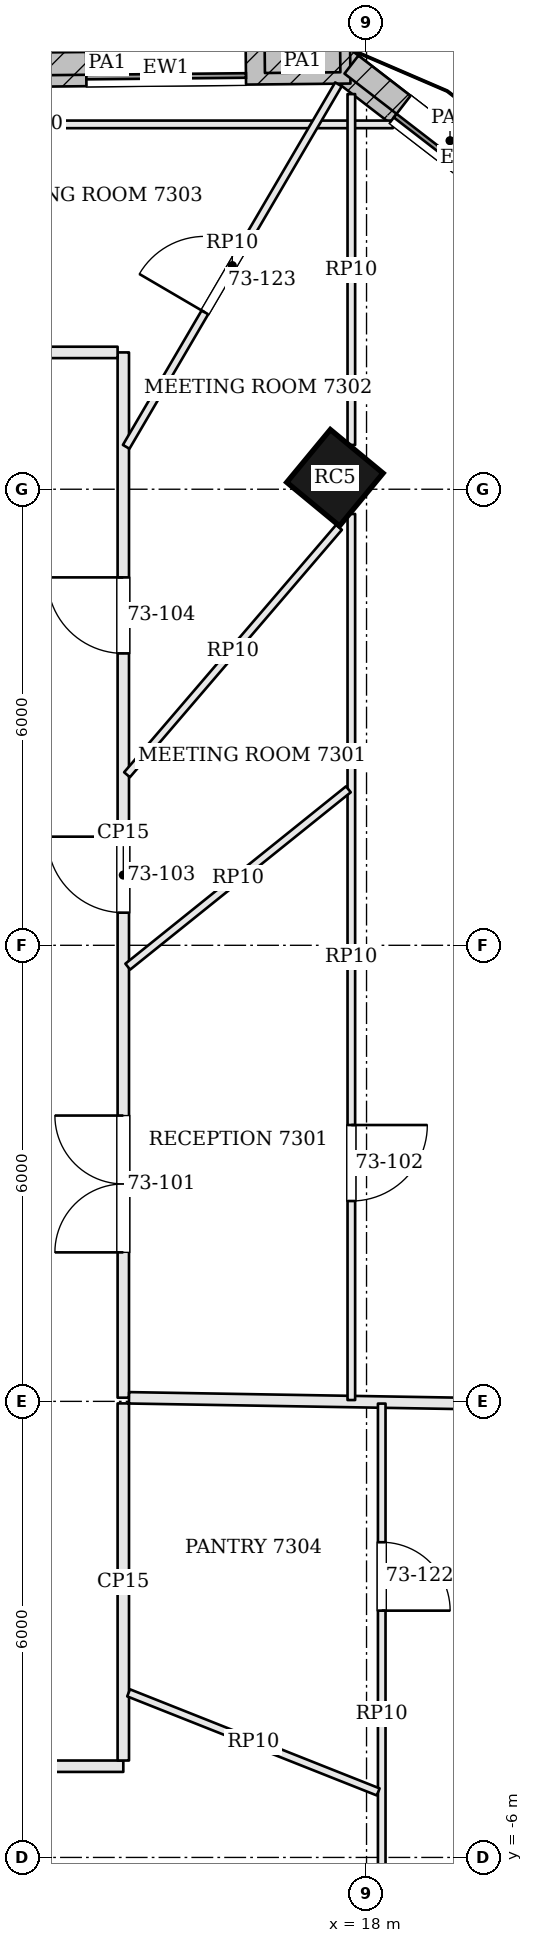
"""IFC4 building model, lengths in metres.
Left out: names, types, materials, properties, quantities, classifications, styles, units other than length and angle.
Written with IfcOpenShell. Run it as: python <this file> out.ifc"""

import sys

from ifc_helpers import new_model, si_unit, direction, frame, frame_2d, origin, origin_2d, place, context, subcontext, project, spatial, rectangle, extrude, element, fill, save


model = new_model("IFC4")
c1 = context("Model", 3, precision=1e-05, world=origin(), true_north=direction((0.0, 1.0)))
c2 = subcontext(c1, "Body", "Model", "MODEL_VIEW")
j1 = project(units=[si_unit("LENGTHUNIT", "METRE"), si_unit("PLANEANGLEUNIT", "RADIAN")], contexts=[c1])
p1 = place(None, origin())
s1 = spatial("IfcSite", under=j1, at=p1, CompositionType="ELEMENT")
p2 = place(p1, origin())
s2 = spatial("IfcBuilding", under=s1, at=p2, CompositionType="ELEMENT")
p3 = place(p2, frame((0.0, 0.0, 296.1)))
s3 = spatial("IfcBuildingStorey", under=s2, at=p3, CompositionType="ELEMENT", Elevation=296.1)
p4 = place(p3, frame((17.584, 12.151, 0.0), z_axis=(0.0, 0.0, 1.0), x_axis=(-0.770679191336, 0.637223339216, 0.0)))
e1 = element("IfcColumn", 1, at=p4, inside=s3, PredefinedType="COLUMN", context=c2, shape_type="SweptSolid", body=[
    extrude(rectangle(XDim=0.9, YDim=0.9, at=origin_2d()), origin(), (0.0, 0.0, 1.0), 3.9),
])
p5 = place(p3, frame((20.896, 15.104, 0.0), z_axis=(0.0, 0.0, 1.0), x_axis=(-0.791693388686, 0.610918634771, 0.0)))
e2 = element("IfcWall", 2, at=p5, inside=s3, PredefinedType="SOLIDWALL", context=c2, shape_type="SweptSolid", body=[
    extrude(rectangle(XDim=4.1, YDim=0.45, at=frame_2d((2.05, 0.0))), origin(), (0.0, 0.0, 1.0), 3.7),
])
p6 = place(p5, frame((1.0, 0.0, 0.9)))
e3 = element("IfcOpeningElement", 3, at=p6, cuts=e2, PredefinedType="OPENING", context=c2, shape_type="SweptSolid", body=[
    extrude(rectangle(XDim=2.1, YDim=2.3, at=frame_2d((1.05, 1.15))), frame((0.0, 0.235, 0.0), z_axis=(0.0, -1.0, 0.0), x_axis=(1.0, 0.0, 0.0)), (0.0, 0.0, 1.0), 0.47),
])
p7 = place(p3, frame((17.786, 17.562, 0.0), z_axis=(0.0, 0.0, 1.0), x_axis=(-0.999950280333, -0.00997180335, 0.0)))
e4 = element("IfcWall", 4, at=p7, inside=s3, PredefinedType="SOLIDWALL", context=c2, shape_type="SweptSolid", body=[
    extrude(rectangle(XDim=4.848, YDim=0.45, at=frame_2d((2.424, 0.0))), origin(), (0.0, 0.0, 1.0), 3.7),
])
p8 = place(p7, frame((1.374, 0.0, 0.9)))
e5 = element("IfcOpeningElement", 5, at=p8, cuts=e4, PredefinedType="OPENING", context=c2, shape_type="SweptSolid", body=[
    extrude(rectangle(XDim=2.1, YDim=2.3, at=frame_2d((1.05, 1.15))), frame((0.0, 0.235, 0.0), z_axis=(0.0, -1.0, 0.0), x_axis=(1.0, 0.0, 0.0)), (0.0, 0.0, 1.0), 0.47),
])
p9 = place(p3, frame((17.362, 17.538, 0.0), z_axis=(0.0, 0.0, 1.0), x_axis=(0.230469860183, 0.973079464148, 0.0)))
e6 = element("IfcWall", 6, at=p9, inside=s3, PredefinedType="SOLIDWALL", context=c2, shape_type="SweptSolid", body=[
    extrude(rectangle(XDim=1.75, YDim=0.2, at=frame_2d((0.875, 0.0))), origin(), (0.0, 0.0, 1.0), 3.7),
])
p10 = place(p3, frame((20.396, 15.584, 3.9), z_axis=(0.0, 0.0, 1.0), x_axis=(-0.791653544836, 0.610970265191, 0.0)))
e7 = element("IfcWall", 7, at=p10, inside=s3, PredefinedType="PARAPET", context=c2, shape_type="SweptSolid", body=[
    extrude(rectangle(XDim=3.277, YDim=0.3, at=frame_2d((1.638, 0.0))), origin(), (0.0, 0.0, 1.0), 1.1),
])
p11 = place(p3, frame((17.655, 17.636, 3.9), z_axis=(0.0, 0.0, 1.0), x_axis=(-0.999949189172, -0.010080628659, 0.0)))
e8 = element("IfcWall", 8, at=p11, inside=s3, PredefinedType="PARAPET", context=c2, shape_type="SweptSolid", body=[
    extrude(rectangle(XDim=0.993, YDim=0.3, at=frame_2d((0.497, 0.0))), origin(), (0.0, 0.0, 1.0), 1.1),
])
p12 = place(p3, frame((16.205, 17.621, 3.9), z_axis=(0.0, 0.0, 1.0), x_axis=(-0.999950267811, -0.009973058961, 0.0)))
e9 = element("IfcWall", 9, at=p12, inside=s3, PredefinedType="PARAPET", context=c2, shape_type="SweptSolid", body=[
    extrude(rectangle(XDim=3.231, YDim=0.3, at=frame_2d((1.616, 0.0))), origin(), (0.0, 0.0, 1.0), 1.1),
])
p13 = place(p3, frame((14.8, 0.048, 0.0), z_axis=(0.0, 0.0, 1.0), x_axis=(0.0, 1.0, 0.0)))
e10 = element("IfcWall", 10, at=p13, inside=s3, PredefinedType="PARTITIONING", context=c2, shape_type="SweptSolid", body=[
    extrude(rectangle(XDim=13.752, YDim=0.15, at=frame_2d((6.876, 0.0))), origin(), (0.0, 0.0, 1.0), 3.198),
])
p14 = place(p13, frame((1.912, 0.0, 0.0)))
e11 = element("IfcOpeningElement", 11, at=p14, cuts=e10, PredefinedType="OPENING", context=c2, shape_type="SweptSolid", body=[
    extrude(rectangle(XDim=1.8, YDim=2.1, at=frame_2d((0.9, 1.05))), frame((0.0, 0.085, 0.0), z_axis=(0.0, -1.0, 0.0), x_axis=(1.0, 0.0, 0.0)), (0.0, 0.0, 1.0), 0.17),
])
p15 = place(p13, frame((6.381, 0.0, 0.0)))
e12 = element("IfcOpeningElement", 12, at=p15, cuts=e10, PredefinedType="OPENING", context=c2, shape_type="SweptSolid", body=[
    extrude(rectangle(XDim=1.0, YDim=2.4, at=frame_2d((0.5, 1.2))), frame((0.0, 0.085, 0.0), z_axis=(0.0, -1.0, 0.0), x_axis=(1.0, 0.0, 0.0)), (0.0, 0.0, 1.0), 0.17),
])
p16 = place(p13, frame((9.792, 0.0, 0.0)))
e13 = element("IfcOpeningElement", 13, at=p16, cuts=e10, PredefinedType="OPENING", context=c2, shape_type="SweptSolid", body=[
    extrude(rectangle(XDim=1.0, YDim=2.4, at=frame_2d((0.5, 1.2))), frame((0.0, 0.085, 0.0), z_axis=(0.0, -1.0, 0.0), x_axis=(1.0, 0.0, 0.0)), (0.0, 0.0, 1.0), 0.17),
])
p17 = place(p3, frame((14.725, 13.8, 0.0), z_axis=(0.0, 0.0, 1.0), x_axis=(-1.0, 0.0, 0.0)))
e14 = element("IfcWall", 14, at=p17, inside=s3, PredefinedType="PARTITIONING", context=c2, shape_type="SweptSolid", body=[
    extrude(rectangle(XDim=14.834, YDim=0.15, at=frame_2d((7.417, 0.0))), origin(), (0.0, 0.0, 1.0), 3.198),
])
p18 = place(p17, frame((3.1, 0.0, 0.0)))
e15 = element("IfcOpeningElement", 15, at=p18, cuts=e14, PredefinedType="OPENING", context=c2, shape_type="SweptSolid", body=[
    extrude(rectangle(XDim=1.0, YDim=2.4, at=frame_2d((0.5, 1.2))), frame((0.0, 0.085, 0.0), z_axis=(0.0, -1.0, 0.0), x_axis=(1.0, 0.0, 0.0)), (0.0, 0.0, 1.0), 0.17),
])
p19 = place(p17, frame((4.5, 0.0, 0.0)))
e16 = element("IfcOpeningElement", 16, at=p19, cuts=e14, PredefinedType="OPENING", context=c2, shape_type="SweptSolid", body=[
    extrude(rectangle(XDim=1.0, YDim=2.4, at=frame_2d((0.5, 1.2))), frame((0.0, 0.085, 0.0), z_axis=(0.0, -1.0, 0.0), x_axis=(1.0, 0.0, 0.0)), (0.0, 0.0, 1.0), 0.17),
])
p20 = place(p17, frame((8.75, 0.0, 0.0)))
e17 = element("IfcOpeningElement", 17, at=p20, cuts=e14, PredefinedType="OPENING", context=c2, shape_type="SweptSolid", body=[
    extrude(rectangle(XDim=1.0, YDim=2.1, at=frame_2d((0.5, 1.05))), frame((0.0, 0.085, 0.0), z_axis=(0.0, -1.0, 0.0), x_axis=(1.0, 0.0, 0.0)), (0.0, 0.0, 1.0), 0.17),
])
p21 = place(p17, frame((12.95, 0.0, 0.0)))
e18 = element("IfcOpeningElement", 18, at=p21, cuts=e14, PredefinedType="OPENING", context=c2, shape_type="SweptSolid", body=[
    extrude(rectangle(XDim=0.9, YDim=2.1, at=frame_2d((0.45, 1.05))), frame((0.0, 0.085, 0.0), z_axis=(0.0, -1.0, 0.0), x_axis=(1.0, 0.0, 0.0)), (0.0, 0.0, 1.0), 0.17),
])
p22 = place(p3, frame((26.674, -0.152, 0.0), z_axis=(0.0, 0.0, 1.0), x_axis=(-0.999857497038, 0.01688151702, 0.0)))
e19 = element("IfcWall", 19, at=p22, inside=s3, PredefinedType="PARTITIONING", context=c2, shape_type="SweptSolid", body=[
    extrude(rectangle(XDim=11.801, YDim=0.15, at=frame_2d((5.9, 0.0))), origin(), (0.0, 0.0, 1.0), 3.234),
])
p23 = place(p3, frame((-0.11, -4.8, 0.0), z_axis=(0.0, 0.0, 1.0), x_axis=(1.0, 0.0, 0.0)))
e20 = element("IfcWall", 20, at=p23, inside=s3, PredefinedType="PARTITIONING", context=c2, shape_type="SweptSolid", body=[
    extrude(rectangle(XDim=14.91, YDim=0.15, at=frame_2d((7.455, 0.0))), origin(), (0.0, 0.0, 1.0), 3.198),
])
p24 = place(p23, frame((2.457, 0.0, 0.0)))
e21 = element("IfcOpeningElement", 21, at=p24, cuts=e20, PredefinedType="OPENING", context=c2, shape_type="SweptSolid", body=[
    extrude(rectangle(XDim=1.8, YDim=2.1, at=frame_2d((0.9, 1.05))), frame((0.0, 0.085, 0.0), z_axis=(0.0, -1.0, 0.0), x_axis=(1.0, 0.0, 0.0)), (0.0, 0.0, 1.0), 0.17),
])
p25 = place(p23, frame((7.992, 0.0, 0.0)))
e22 = element("IfcOpeningElement", 22, at=p25, cuts=e20, PredefinedType="OPENING", context=c2, shape_type="SweptSolid", body=[
    extrude(rectangle(XDim=1.0, YDim=2.4, at=frame_2d((0.5, 1.2))), frame((0.0, 0.085, 0.0), z_axis=(0.0, -1.0, 0.0), x_axis=(1.0, 0.0, 0.0)), (0.0, 0.0, 1.0), 0.17),
])
p26 = place(p23, frame((12.549, 0.0, 0.0)))
e23 = element("IfcOpeningElement", 23, at=p26, cuts=e20, PredefinedType="OPENING", context=c2, shape_type="SweptSolid", body=[
    extrude(rectangle(XDim=1.0, YDim=2.4, at=frame_2d((0.5, 1.2))), frame((0.0, 0.085, 0.0), z_axis=(0.0, -1.0, 0.0), x_axis=(1.0, 0.0, 0.0)), (0.0, 0.0, 1.0), 0.17),
])
p27 = place(p3, frame((14.8, -4.725, 0.0), z_axis=(0.0, 0.0, 1.0), x_axis=(0.0, 1.0, 0.0)))
e24 = element("IfcWall", 24, at=p27, inside=s3, PredefinedType="PARTITIONING", context=c2, shape_type="SweptSolid", body=[
    extrude(rectangle(XDim=4.698, YDim=0.15, at=frame_2d((2.349, 0.0))), origin(), (0.0, 0.0, 1.0), 3.198),
])
p28 = place(p3, frame((8.97, 16.8, 0.0), z_axis=(0.0, 0.0, 1.0), x_axis=(1.0, 0.0, 0.0)))
e25 = element("IfcWall", 25, at=p28, inside=s3, PredefinedType="PARTITIONING", context=c2, shape_type="SweptSolid", body=[
    extrude(rectangle(XDim=9.377, YDim=0.1, at=frame_2d((4.688, 0.0))), origin(), (0.0, 0.0, 1.0), 3.184),
])
p29 = place(p3, frame((17.8, 17.198, 0.0), z_axis=(0.0, 0.0, 1.0), x_axis=(0.0, -1.0, 0.0)))
e26 = element("IfcWall", 26, at=p29, inside=s3, PredefinedType="PARTITIONING", context=c2, shape_type="SweptSolid", body=[
    extrude(rectangle(XDim=4.616, YDim=0.1, at=frame_2d((2.308, 0.0))), origin(), (0.0, 0.0, 1.0), 3.184),
])
p30 = place(p3, frame((17.8, 11.675, 0.0), z_axis=(0.0, 0.0, 1.0), x_axis=(0.0, -1.0, 0.0)))
e27 = element("IfcWall", 27, at=p30, inside=s3, PredefinedType="PARTITIONING", context=c2, shape_type="SweptSolid", body=[
    extrude(rectangle(XDim=11.657, YDim=0.1, at=frame_2d((5.829, 0.0))), origin(), (0.0, 0.0, 1.0), 3.184),
])
p31 = place(p30, frame((8.039, 0.0, 0.0)))
e28 = element("IfcOpeningElement", 28, at=p31, cuts=e27, PredefinedType="OPENING", context=c2, shape_type="SweptSolid", body=[
    extrude(rectangle(XDim=1.0, YDim=2.1, at=frame_2d((0.5, 1.05))), frame((0.0, 0.06, 0.0), z_axis=(0.0, -1.0, 0.0), x_axis=(1.0, 0.0, 0.0)), (0.0, 0.0, 1.0), 0.12),
])
p32 = place(p3, frame((14.858, 5.719, 0.0), z_axis=(0.0, 0.0, 1.0), x_axis=(0.779434046092, 0.626484291737, 0.0)))
e29 = element("IfcWall", 29, at=p32, inside=s3, PredefinedType="PARTITIONING", context=c2, shape_type="SweptSolid", body=[
    extrude(rectangle(XDim=3.724, YDim=0.1, at=frame_2d((1.862, 0.0))), origin(), (0.0, 0.0, 1.0), 3.184),
])
p33 = place(p3, frame((14.849, 8.244, 0.0), z_axis=(0.0, 0.0, 1.0), x_axis=(0.650735079705, 0.759304850532, 0.0)))
e30 = element("IfcWall", 30, at=p33, inside=s3, PredefinedType="PARTITIONING", context=c2, shape_type="SweptSolid", body=[
    extrude(rectangle(XDim=4.286, YDim=0.1, at=frame_2d((2.143, 0.0))), origin(), (0.0, 0.0, 1.0), 3.184),
])
p34 = place(p3, frame((14.838, 12.558, 0.0), z_axis=(0.0, 0.0, 1.0), x_axis=(0.505293152316, 0.862947756369, 0.0)))
e31 = element("IfcWall", 31, at=p34, inside=s3, PredefinedType="PARTITIONING", context=c2, shape_type="SweptSolid", body=[
    extrude(rectangle(XDim=5.526, YDim=0.1, at=frame_2d((2.763, 0.0))), origin(), (0.0, 0.0, 1.0), 3.184),
])
p35 = place(p34, frame((2.05, 0.0, 0.0)))
e32 = element("IfcOpeningElement", 32, at=p35, cuts=e31, PredefinedType="OPENING", context=c2, shape_type="SweptSolid", body=[
    extrude(rectangle(XDim=1.0, YDim=2.4, at=frame_2d((0.5, 1.2))), frame((0.0, 0.06, 0.0), z_axis=(0.0, -1.0, 0.0), x_axis=(1.0, 0.0, 0.0)), (0.0, 0.0, 1.0), 0.12),
])
p36 = place(p3, frame((18.2, -0.029, 0.0), z_axis=(0.0, 0.0, 1.0), x_axis=(0.0, -1.0, 0.0)))
e33 = element("IfcWall", 33, at=p36, inside=s3, PredefinedType="PARTITIONING", context=c2, shape_type="SweptSolid", body=[
    extrude(rectangle(XDim=8.171, YDim=0.1, at=frame_2d((4.085, 0.0))), origin(), (0.0, 0.0, 1.0), 3.184),
])
p37 = place(p36, frame((1.824, 0.0, 0.0)))
e34 = element("IfcOpeningElement", 34, at=p37, cuts=e33, PredefinedType="OPENING", context=c2, shape_type="SweptSolid", body=[
    extrude(rectangle(XDim=0.9, YDim=2.1, at=frame_2d((0.45, 1.05))), frame((0.0, 0.06, 0.0), z_axis=(0.0, -1.0, 0.0), x_axis=(1.0, 0.0, 0.0)), (0.0, 0.0, 1.0), 0.12),
])
p38 = place(p3, frame((14.87, -3.835, 0.0), z_axis=(0.0, 0.0, 1.0), x_axis=(0.9294835662, -0.368863525119, 0.0)))
e35 = element("IfcWall", 35, at=p38, inside=s3, PredefinedType="PARTITIONING", context=c2, shape_type="SweptSolid", body=[
    extrude(rectangle(XDim=3.533, YDim=0.1, at=frame_2d((1.767, 0.0))), origin(), (0.0, 0.0, 1.0), 3.184),
])
p39 = place(p6, origin())
e36 = element("IfcWindow", 36, at=p39, inside=s3, PartitioningType="SINGLE_PANEL", PredefinedType="WINDOW", context=c2, shape_type="SweptSolid", body=[
    extrude(rectangle(XDim=2.1, YDim=2.3, at=frame_2d((1.05, 1.15))), frame((0.0, 0.135, 0.0), z_axis=(0.0, -1.0, 0.0), x_axis=(1.0, 0.0, 0.0)), (0.0, 0.0, 1.0), 0.06),
])
fill(e3, e36)
p40 = place(p8, origin())
e37 = element("IfcWindow", 37, at=p40, inside=s3, PartitioningType="SINGLE_PANEL", PredefinedType="WINDOW", context=c2, shape_type="SweptSolid", body=[
    extrude(rectangle(XDim=2.1, YDim=2.3, at=frame_2d((1.05, 1.15))), frame((0.0, 0.135, 0.0), z_axis=(0.0, -1.0, 0.0), x_axis=(1.0, 0.0, 0.0)), (0.0, 0.0, 1.0), 0.06),
])
fill(e5, e37)
p41 = place(p14, origin())
e38 = element("IfcDoor", 38, at=p41, inside=s3, OperationType="DOUBLE_DOOR_SINGLE_SWING", PredefinedType="DOOR", context=c2, shape_type="SweptSolid", body=[
    extrude(rectangle(XDim=1.8, YDim=2.1, at=frame_2d((0.9, 1.05))), frame((0.0, 0.025, 0.0), z_axis=(0.0, -1.0, 0.0), x_axis=(1.0, 0.0, 0.0)), (0.0, 0.0, 1.0), 0.05),
])
fill(e11, e38)
p42 = place(p31, origin())
e39 = element("IfcDoor", 39, at=p42, inside=s3, OperationType="SINGLE_SWING_LEFT", PredefinedType="DOOR", context=c2, shape_type="SweptSolid", body=[
    extrude(rectangle(XDim=1.0, YDim=2.1, at=frame_2d((0.5, 1.05))), frame((0.0, 0.025, 0.0), z_axis=(0.0, -1.0, 0.0), x_axis=(1.0, 0.0, 0.0)), (0.0, 0.0, 1.0), 0.05),
])
fill(e28, e39)
p43 = place(p15, origin())
e40 = element("IfcDoor", 40, at=p43, inside=s3, OperationType="SINGLE_SWING_RIGHT", PredefinedType="DOOR", context=c2, shape_type="SweptSolid", body=[
    extrude(rectangle(XDim=1.0, YDim=2.4, at=frame_2d((0.5, 1.2))), frame((0.0, 0.025, 0.0), z_axis=(0.0, -1.0, 0.0), x_axis=(1.0, 0.0, 0.0)), (0.0, 0.0, 1.0), 0.05),
])
fill(e12, e40)
p44 = place(p16, origin())
e41 = element("IfcDoor", 41, at=p44, inside=s3, OperationType="SINGLE_SWING_RIGHT", PredefinedType="DOOR", context=c2, shape_type="SweptSolid", body=[
    extrude(rectangle(XDim=1.0, YDim=2.4, at=frame_2d((0.5, 1.2))), frame((0.0, 0.025, 0.0), z_axis=(0.0, -1.0, 0.0), x_axis=(1.0, 0.0, 0.0)), (0.0, 0.0, 1.0), 0.05),
])
fill(e13, e41)
p45 = place(p37, origin())
e42 = element("IfcDoor", 42, at=p45, inside=s3, OperationType="SINGLE_SWING_RIGHT", PredefinedType="DOOR", context=c2, shape_type="SweptSolid", body=[
    extrude(rectangle(XDim=0.9, YDim=2.1, at=frame_2d((0.45, 1.05))), frame((0.0, 0.025, 0.0), z_axis=(0.0, -1.0, 0.0), x_axis=(1.0, 0.0, 0.0)), (0.0, 0.0, 1.0), 0.05),
])
fill(e34, e42)
p46 = place(p35, origin())
e43 = element("IfcDoor", 43, at=p46, inside=s3, OperationType="SINGLE_SWING_LEFT", PredefinedType="DOOR", context=c2, shape_type="SweptSolid", body=[
    extrude(rectangle(XDim=1.0, YDim=2.4, at=frame_2d((0.5, 1.2))), frame((0.0, 0.025, 0.0), z_axis=(0.0, -1.0, 0.0), x_axis=(1.0, 0.0, 0.0)), (0.0, 0.0, 1.0), 0.05),
])
fill(e32, e43)
save(model, sys.argv[1])
